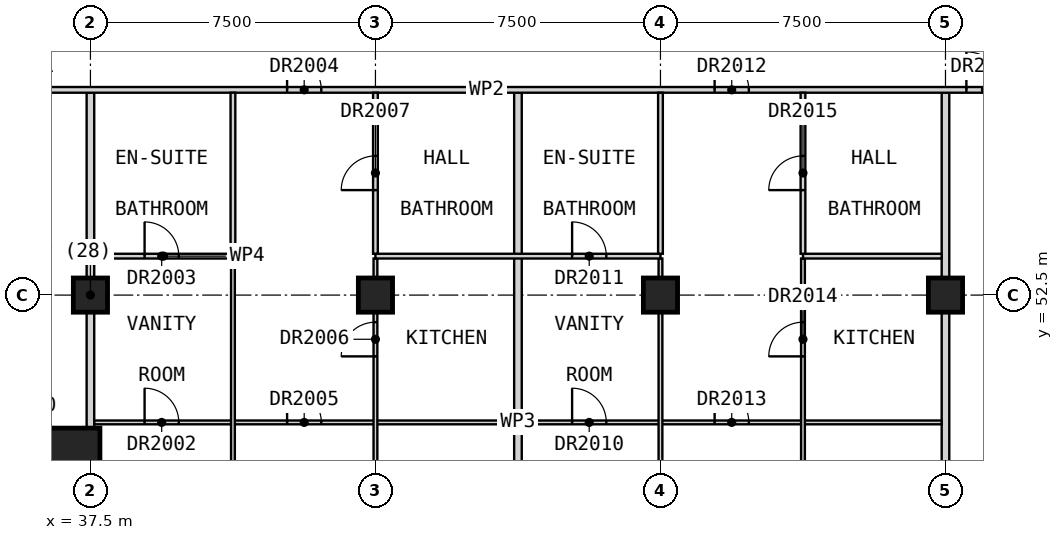
"""IFC4 building model, lengths in metres.
Left out: names, types, materials, properties, quantities, classifications, styles, units other than length and angle.
Written with IfcOpenShell. Run it as: python <this file> out.ifc"""

import sys

from ifc_helpers import new_model, si_unit, direction, frame, frame_2d, origin, origin_2d, place, context, subcontext, project, spatial, rectangle, extrude, element, fill, save


model = new_model("IFC4")
c1 = context("Model", 3, precision=1e-05, world=origin(), true_north=direction((0.0, 1.0)))
c2 = subcontext(c1, "Body", "Model", "MODEL_VIEW")
j1 = project(units=[si_unit("LENGTHUNIT", "METRE"), si_unit("PLANEANGLEUNIT", "RADIAN")], contexts=[c1])
p1 = place(None, origin())
s1 = spatial("IfcSite", under=j1, at=p1, CompositionType="ELEMENT")
p2 = place(p1, origin())
s2 = spatial("IfcBuilding", under=s1, at=p2, CompositionType="ELEMENT")
p3 = place(p2, frame((0.0, 0.0, 210.7)))
s3 = spatial("IfcBuildingStorey", under=s2, at=p3, CompositionType="ELEMENT", Elevation=210.7)
for number, where, z_axis, x_axis in (
    (1, (37.5, 52.5, 0.0), (0.0, 0.0, 1.0), (1.0, 0.0, 0.0)),
    (2, (45.0, 52.5, 0.0), (0.0, 0.0, 1.0), (1.0, 0.0, 0.0)),
    (3, (52.5, 52.5, 0.0), (0.0, 0.0, 1.0), (1.0, 0.0, 0.0)),
    (4, (60.0, 52.5, 0.0), (0.0, 0.0, 1.0), (1.0, 0.0, 0.0)),
):
    element("IfcColumn", number, at=place(p3, frame(where, z_axis=z_axis, x_axis=x_axis)), inside=s3, PredefinedType="COLUMN", context=c2, shape_type="SweptSolid", body=[
        extrude(rectangle(XDim=0.9, YDim=0.9, at=origin_2d()), origin(), (0.0, 0.0, 1.0), 3.5),
    ])
p4 = place(p3, frame((36.125, 47.375, 0.0), z_axis=(0.0, 0.0, 1.0), x_axis=(1.0, 0.0, 0.0)))
e5 = element("IfcColumn", 5, at=p4, inside=s3, PredefinedType="COLUMN", context=c2, shape_type="SweptSolid", body=[
    extrude(rectangle(XDim=3.25, YDim=3.25, at=origin_2d()), origin(), (0.0, 0.0, 1.0), 3.5),
])
p5 = place(p3, frame((37.5, 41.25, 0.0), z_axis=(0.0, 0.0, 1.0), x_axis=(0.0, 1.0, 0.0)))
e6 = element("IfcWall", 6, at=p5, inside=s3, PredefinedType="PARTITIONING", context=c2, shape_type="SweptSolid", body=[
    extrude(rectangle(XDim=16.575, YDim=0.2, at=frame_2d((8.288, 0.0))), origin(), (0.0, 0.0, 1.0), 2.75),
])
p6 = place(p3, frame((48.75, 42.06, 0.0), z_axis=(0.0, 0.0, 1.0), x_axis=(0.0, 1.0, 0.0)))
e7 = element("IfcWall", 7, at=p6, inside=s3, PredefinedType="PARTITIONING", context=c2, shape_type="SweptSolid", body=[
    extrude(rectangle(XDim=15.765, YDim=0.2, at=frame_2d((7.882, 0.0))), origin(), (0.0, 0.0, 1.0), 3.1),
])
p7 = place(p3, frame((60.0, 41.25, 0.0), z_axis=(0.0, 0.0, 1.0), x_axis=(0.0, 1.0, 0.0)))
e8 = element("IfcWall", 8, at=p7, inside=s3, PredefinedType="PARTITIONING", context=c2, shape_type="SweptSolid", body=[
    extrude(rectangle(XDim=16.575, YDim=0.2, at=frame_2d((8.288, 0.0))), origin(), (0.0, 0.0, 1.0), 3.1),
])
p8 = place(p3, frame((33.75, 57.9, 0.0), z_axis=(0.0, 0.0, 1.0), x_axis=(1.0, 0.0, 0.0)))
e9 = element("IfcWall", 9, at=p8, inside=s3, PredefinedType="PARTITIONING", context=c2, shape_type="SweptSolid", body=[
    extrude(rectangle(XDim=28.35, YDim=0.15, at=frame_2d((14.175, 0.0))), origin(), (0.0, 0.0, 1.0), 3.1),
])
p9 = place(p8, frame((1.375, 0.0, 0.0)))
e10 = element("IfcOpeningElement", 10, at=p9, cuts=e9, PredefinedType="OPENING", context=c2, shape_type="SweptSolid", body=[
    extrude(rectangle(XDim=1.0, YDim=2.1, at=frame_2d((0.5, 1.05))), frame((0.0, 0.085, 0.0), z_axis=(0.0, -1.0, 0.0), x_axis=(1.0, 0.0, 0.0)), (0.0, 0.0, 1.0), 0.17),
])
p10 = place(p8, frame((8.925, 0.0, 0.0)))
e11 = element("IfcOpeningElement", 11, at=p10, cuts=e9, PredefinedType="OPENING", context=c2, shape_type="SweptSolid", body=[
    extrude(rectangle(XDim=0.9, YDim=2.1, at=frame_2d((0.45, 1.05))), frame((0.0, 0.085, 0.0), z_axis=(0.0, -1.0, 0.0), x_axis=(1.0, 0.0, 0.0)), (0.0, 0.0, 1.0), 0.17),
])
p11 = place(p8, frame((20.175, 0.0, 0.0)))
e12 = element("IfcOpeningElement", 12, at=p11, cuts=e9, PredefinedType="OPENING", context=c2, shape_type="SweptSolid", body=[
    extrude(rectangle(XDim=0.9, YDim=2.1, at=frame_2d((0.45, 1.05))), frame((0.0, 0.085, 0.0), z_axis=(0.0, -1.0, 0.0), x_axis=(1.0, 0.0, 0.0)), (0.0, 0.0, 1.0), 0.17),
])
p12 = place(p8, frame((26.8, 0.0, 0.0)))
e13 = element("IfcOpeningElement", 13, at=p12, cuts=e9, PredefinedType="OPENING", context=c2, shape_type="SweptSolid", body=[
    extrude(rectangle(XDim=1.0, YDim=2.1, at=frame_2d((0.5, 1.05))), frame((0.0, 0.085, 0.0), z_axis=(0.0, -1.0, 0.0), x_axis=(1.0, 0.0, 0.0)), (0.0, 0.0, 1.0), 0.17),
])
p13 = place(p3, frame((37.6, 49.15, 0.0), z_axis=(0.0, 0.0, 1.0), x_axis=(1.0, 0.0, 0.0)))
e14 = element("IfcWall", 14, at=p13, inside=s3, PredefinedType="PARTITIONING", context=c2, shape_type="SweptSolid", body=[
    extrude(rectangle(XDim=22.3, YDim=0.1, at=frame_2d((11.15, 0.0))), origin(), (0.0, 0.0, 1.0), 3.1),
])
p14 = place(p13, frame((1.325, 0.0, 0.0)))
e15 = element("IfcOpeningElement", 15, at=p14, cuts=e14, PredefinedType="OPENING", context=c2, shape_type="SweptSolid", body=[
    extrude(rectangle(XDim=0.9, YDim=2.1, at=frame_2d((0.45, 1.05))), frame((0.0, 0.06, 0.0), z_axis=(0.0, -1.0, 0.0), x_axis=(1.0, 0.0, 0.0)), (0.0, 0.0, 1.0), 0.12),
])
p15 = place(p13, frame((5.075, 0.0, 0.0)))
e16 = element("IfcOpeningElement", 16, at=p15, cuts=e14, PredefinedType="OPENING", context=c2, shape_type="SweptSolid", body=[
    extrude(rectangle(XDim=0.9, YDim=2.1, at=frame_2d((0.45, 1.05))), frame((0.0, 0.06, 0.0), z_axis=(0.0, -1.0, 0.0), x_axis=(1.0, 0.0, 0.0)), (0.0, 0.0, 1.0), 0.12),
])
p16 = place(p13, frame((12.575, 0.0, 0.0)))
e17 = element("IfcOpeningElement", 17, at=p16, cuts=e14, PredefinedType="OPENING", context=c2, shape_type="SweptSolid", body=[
    extrude(rectangle(XDim=0.9, YDim=2.1, at=frame_2d((0.45, 1.05))), frame((0.0, 0.06, 0.0), z_axis=(0.0, -1.0, 0.0), x_axis=(1.0, 0.0, 0.0)), (0.0, 0.0, 1.0), 0.12),
])
p17 = place(p13, frame((16.325, 0.0, 0.0)))
e18 = element("IfcOpeningElement", 18, at=p17, cuts=e14, PredefinedType="OPENING", context=c2, shape_type="SweptSolid", body=[
    extrude(rectangle(XDim=0.9, YDim=2.1, at=frame_2d((0.45, 1.05))), frame((0.0, 0.06, 0.0), z_axis=(0.0, -1.0, 0.0), x_axis=(1.0, 0.0, 0.0)), (0.0, 0.0, 1.0), 0.12),
])
p18 = place(p3, frame((41.25, 42.06, 0.0), z_axis=(0.0, 0.0, 1.0), x_axis=(0.0, 1.0, 0.0)))
e19 = element("IfcWall", 19, at=p18, inside=s3, PredefinedType="PARTITIONING", context=c2, shape_type="SweptSolid", body=[
    extrude(rectangle(XDim=11.402, YDim=0.1, at=frame_2d((5.701, 0.0))), origin(), (0.0, 0.0, 1.0), 3.1),
])
p19 = place(p18, frame((2.69, 0.0, 0.0)))
e20 = element("IfcOpeningElement", 20, at=p19, cuts=e19, PredefinedType="OPENING", context=c2, shape_type="SweptSolid", body=[
    extrude(rectangle(XDim=0.9, YDim=2.1, at=frame_2d((0.45, 1.05))), frame((0.0, 0.06, 0.0), z_axis=(0.0, -1.0, 0.0), x_axis=(1.0, 0.0, 0.0)), (0.0, 0.0, 1.0), 0.12),
])
p20 = place(p3, frame((45.0, 41.25, 0.0), z_axis=(0.0, 0.0, 1.0), x_axis=(0.0, 1.0, 0.0)))
e21 = element("IfcWall", 21, at=p20, inside=s3, PredefinedType="PARTITIONING", context=c2, shape_type="SweptSolid", body=[
    extrude(rectangle(XDim=12.212, YDim=0.1, at=frame_2d((6.106, 0.0))), origin(), (0.0, 0.0, 1.0), 3.1),
])
p21 = place(p20, frame((9.637, 0.0, 0.0)))
e22 = element("IfcOpeningElement", 22, at=p21, cuts=e21, PredefinedType="OPENING", context=c2, shape_type="SweptSolid", body=[
    extrude(rectangle(XDim=0.9, YDim=2.1, at=frame_2d((0.45, 1.05))), frame((0.0, 0.06, 0.0), z_axis=(0.0, -1.0, 0.0), x_axis=(1.0, 0.0, 0.0)), (0.0, 0.0, 1.0), 0.12),
])
p22 = place(p20, frame((2.85, 0.0, 0.0)))
e23 = element("IfcOpeningElement", 23, at=p22, cuts=e21, PredefinedType="OPENING", context=c2, shape_type="SweptSolid", body=[
    extrude(rectangle(XDim=0.9, YDim=2.1, at=frame_2d((0.45, 1.05))), frame((0.0, 0.06, 0.0), z_axis=(0.0, -1.0, 0.0), x_axis=(1.0, 0.0, 0.0)), (0.0, 0.0, 1.0), 0.12),
])
p23 = place(p3, frame((52.5, 41.25, 0.0), z_axis=(0.0, 0.0, 1.0), x_axis=(0.0, 1.0, 0.0)))
e24 = element("IfcWall", 24, at=p23, inside=s3, PredefinedType="PARTITIONING", context=c2, shape_type="SweptSolid", body=[
    extrude(rectangle(XDim=12.212, YDim=0.1, at=frame_2d((6.106, 0.0))), origin(), (0.0, 0.0, 1.0), 3.1),
])
p24 = place(p23, frame((2.85, 0.0, 0.0)))
e25 = element("IfcOpeningElement", 25, at=p24, cuts=e24, PredefinedType="OPENING", context=c2, shape_type="SweptSolid", body=[
    extrude(rectangle(XDim=0.9, YDim=2.1, at=frame_2d((0.45, 1.05))), frame((0.0, 0.06, 0.0), z_axis=(0.0, -1.0, 0.0), x_axis=(1.0, 0.0, 0.0)), (0.0, 0.0, 1.0), 0.12),
])
p25 = place(p3, frame((56.25, 42.06, 0.0), z_axis=(0.0, 0.0, 1.0), x_axis=(0.0, 1.0, 0.0)))
e26 = element("IfcWall", 26, at=p25, inside=s3, PredefinedType="PARTITIONING", context=c2, shape_type="SweptSolid", body=[
    extrude(rectangle(XDim=11.402, YDim=0.1, at=frame_2d((5.701, 0.0))), origin(), (0.0, 0.0, 1.0), 3.1),
])
p26 = place(p25, frame((8.827, 0.0, 0.0)))
e27 = element("IfcOpeningElement", 27, at=p26, cuts=e26, PredefinedType="OPENING", context=c2, shape_type="SweptSolid", body=[
    extrude(rectangle(XDim=0.9, YDim=2.1, at=frame_2d((0.45, 1.05))), frame((0.0, 0.06, 0.0), z_axis=(0.0, -1.0, 0.0), x_axis=(1.0, 0.0, 0.0)), (0.0, 0.0, 1.0), 0.12),
])
p27 = place(p25, frame((2.69, 0.0, 0.0)))
e28 = element("IfcOpeningElement", 28, at=p27, cuts=e26, PredefinedType="OPENING", context=c2, shape_type="SweptSolid", body=[
    extrude(rectangle(XDim=0.9, YDim=2.1, at=frame_2d((0.45, 1.05))), frame((0.0, 0.06, 0.0), z_axis=(0.0, -1.0, 0.0), x_axis=(1.0, 0.0, 0.0)), (0.0, 0.0, 1.0), 0.12),
])
p28 = place(p3, frame((37.6, 53.525, 0.0), z_axis=(0.0, 0.0, 1.0), x_axis=(1.0, 0.0, 0.0)))
e29 = element("IfcWall", 29, at=p28, inside=s3, PredefinedType="PARTITIONING", context=c2, shape_type="SweptSolid", body=[
    extrude(rectangle(XDim=3.65, YDim=0.125, at=frame_2d((1.825, 0.0))), origin(), (0.0, 0.0, 1.0), 3.1),
])
p29 = place(p28, frame((1.325, 0.0, 0.0)))
e30 = element("IfcOpeningElement", 30, at=p29, cuts=e29, PredefinedType="OPENING", context=c2, shape_type="SweptSolid", body=[
    extrude(rectangle(XDim=0.9, YDim=2.1, at=frame_2d((0.45, 1.05))), frame((0.0, 0.073, 0.0), z_axis=(0.0, -1.0, 0.0), x_axis=(1.0, 0.0, 0.0)), (0.0, 0.0, 1.0), 0.145),
])
p30 = place(p3, frame((45.0, 53.525, 0.0), z_axis=(0.0, 0.0, 1.0), x_axis=(1.0, 0.0, 0.0)))
e31 = element("IfcWall", 31, at=p30, inside=s3, PredefinedType="PARTITIONING", context=c2, shape_type="SweptSolid", body=[
    extrude(rectangle(XDim=7.5, YDim=0.125, at=frame_2d((3.75, 0.0))), origin(), (0.0, 0.0, 1.0), 3.1),
])
p31 = place(p30, frame((5.175, 0.0, 0.0)))
e32 = element("IfcOpeningElement", 32, at=p31, cuts=e31, PredefinedType="OPENING", context=c2, shape_type="SweptSolid", body=[
    extrude(rectangle(XDim=0.9, YDim=2.1, at=frame_2d((0.45, 1.05))), frame((0.0, 0.073, 0.0), z_axis=(0.0, -1.0, 0.0), x_axis=(1.0, 0.0, 0.0)), (0.0, 0.0, 1.0), 0.145),
])
p32 = place(p3, frame((56.25, 53.525, 0.0), z_axis=(0.0, 0.0, 1.0), x_axis=(1.0, 0.0, 0.0)))
e33 = element("IfcWall", 33, at=p32, inside=s3, PredefinedType="PARTITIONING", context=c2, shape_type="SweptSolid", body=[
    extrude(rectangle(XDim=3.65, YDim=0.125, at=frame_2d((1.825, 0.0))), origin(), (0.0, 0.0, 1.0), 3.1),
])
p33 = place(p3, frame((41.25, 53.587, 0.0), z_axis=(0.0, 0.0, 1.0), x_axis=(0.0, 1.0, 0.0)))
e34 = element("IfcWall", 34, at=p33, inside=s3, PredefinedType="PARTITIONING", context=c2, shape_type="SweptSolid", body=[
    extrude(rectangle(XDim=4.238, YDim=0.125, at=frame_2d((2.119, 0.0))), origin(), (0.0, 0.0, 1.0), 3.1),
])
p34 = place(p3, frame((45.0, 53.587, 0.0), z_axis=(0.0, 0.0, 1.0), x_axis=(0.0, 1.0, 0.0)))
e35 = element("IfcWall", 35, at=p34, inside=s3, PredefinedType="PARTITIONING", context=c2, shape_type="SweptSolid", body=[
    extrude(rectangle(XDim=4.238, YDim=0.125, at=frame_2d((2.119, 0.0))), origin(), (0.0, 0.0, 1.0), 3.1),
])
p35 = place(p34, frame((1.675, 0.0, 0.0)))
e36 = element("IfcOpeningElement", 36, at=p35, cuts=e35, PredefinedType="OPENING", context=c2, shape_type="SweptSolid", body=[
    extrude(rectangle(XDim=0.9, YDim=2.1, at=frame_2d((0.45, 1.05))), frame((0.0, 0.073, 0.0), z_axis=(0.0, -1.0, 0.0), x_axis=(1.0, 0.0, 0.0)), (0.0, 0.0, 1.0), 0.145),
])
p36 = place(p3, frame((52.5, 53.587, 0.0), z_axis=(0.0, 0.0, 1.0), x_axis=(0.0, 1.0, 0.0)))
e37 = element("IfcWall", 37, at=p36, inside=s3, PredefinedType="PARTITIONING", context=c2, shape_type="SweptSolid", body=[
    extrude(rectangle(XDim=4.238, YDim=0.125, at=frame_2d((2.119, 0.0))), origin(), (0.0, 0.0, 1.0), 3.1),
])
p37 = place(p3, frame((56.25, 53.587, 0.0), z_axis=(0.0, 0.0, 1.0), x_axis=(0.0, 1.0, 0.0)))
e38 = element("IfcWall", 38, at=p37, inside=s3, PredefinedType="PARTITIONING", context=c2, shape_type="SweptSolid", body=[
    extrude(rectangle(XDim=4.238, YDim=0.125, at=frame_2d((2.119, 0.0))), origin(), (0.0, 0.0, 1.0), 3.1),
])
p38 = place(p37, frame((1.675, 0.0, 0.0)))
e39 = element("IfcOpeningElement", 39, at=p38, cuts=e38, PredefinedType="OPENING", context=c2, shape_type="SweptSolid", body=[
    extrude(rectangle(XDim=0.9, YDim=2.1, at=frame_2d((0.45, 1.05))), frame((0.0, 0.073, 0.0), z_axis=(0.0, -1.0, 0.0), x_axis=(1.0, 0.0, 0.0)), (0.0, 0.0, 1.0), 0.145),
])
p39 = place(p14, origin())
e40 = element("IfcDoor", 40, at=p39, inside=s3, OperationType="SINGLE_SWING_LEFT", PredefinedType="DOOR", context=c2, shape_type="SweptSolid", body=[
    extrude(rectangle(XDim=0.9, YDim=2.1, at=frame_2d((0.45, 1.05))), frame((0.0, 0.025, 0.0), z_axis=(0.0, -1.0, 0.0), x_axis=(1.0, 0.0, 0.0)), (0.0, 0.0, 1.0), 0.05),
])
fill(e15, e40)
p40 = place(p29, origin())
e41 = element("IfcDoor", 41, at=p40, inside=s3, OperationType="SINGLE_SWING_LEFT", PredefinedType="DOOR", context=c2, shape_type="SweptSolid", body=[
    extrude(rectangle(XDim=0.9, YDim=2.1, at=frame_2d((0.45, 1.05))), frame((0.0, 0.025, 0.0), z_axis=(0.0, -1.0, 0.0), x_axis=(1.0, 0.0, 0.0)), (0.0, 0.0, 1.0), 0.05),
])
fill(e30, e41)
p41 = place(p10, origin())
e42 = element("IfcDoor", 42, at=p41, inside=s3, OperationType="SINGLE_SWING_RIGHT", PredefinedType="DOOR", context=c2, shape_type="SweptSolid", body=[
    extrude(rectangle(XDim=0.9, YDim=2.1, at=frame_2d((0.45, 1.05))), frame((0.0, 0.025, 0.0), z_axis=(0.0, -1.0, 0.0), x_axis=(1.0, 0.0, 0.0)), (0.0, 0.0, 1.0), 0.05),
])
fill(e11, e42)
p42 = place(p15, origin())
e43 = element("IfcDoor", 43, at=p42, inside=s3, OperationType="SINGLE_SWING_LEFT", PredefinedType="DOOR", context=c2, shape_type="SweptSolid", body=[
    extrude(rectangle(XDim=0.9, YDim=2.1, at=frame_2d((0.45, 1.05))), frame((0.0, 0.025, 0.0), z_axis=(0.0, -1.0, 0.0), x_axis=(1.0, 0.0, 0.0)), (0.0, 0.0, 1.0), 0.05),
])
fill(e16, e43)
p43 = place(p21, origin())
e44 = element("IfcDoor", 44, at=p43, inside=s3, OperationType="SINGLE_SWING_RIGHT", PredefinedType="DOOR", context=c2, shape_type="SweptSolid", body=[
    extrude(rectangle(XDim=0.9, YDim=2.1, at=frame_2d((0.45, 1.05))), frame((0.0, 0.025, 0.0), z_axis=(0.0, -1.0, 0.0), x_axis=(1.0, 0.0, 0.0)), (0.0, 0.0, 1.0), 0.05),
])
fill(e22, e44)
p44 = place(p35, origin())
e45 = element("IfcDoor", 45, at=p44, inside=s3, OperationType="SINGLE_SWING_RIGHT", PredefinedType="DOOR", context=c2, shape_type="SweptSolid", body=[
    extrude(rectangle(XDim=0.9, YDim=2.1, at=frame_2d((0.45, 1.05))), frame((0.0, 0.025, 0.0), z_axis=(0.0, -1.0, 0.0), x_axis=(1.0, 0.0, 0.0)), (0.0, 0.0, 1.0), 0.05),
])
fill(e36, e45)
p45 = place(p16, origin())
e46 = element("IfcDoor", 46, at=p45, inside=s3, OperationType="SINGLE_SWING_LEFT", PredefinedType="DOOR", context=c2, shape_type="SweptSolid", body=[
    extrude(rectangle(XDim=0.9, YDim=2.1, at=frame_2d((0.45, 1.05))), frame((0.0, 0.025, 0.0), z_axis=(0.0, -1.0, 0.0), x_axis=(1.0, 0.0, 0.0)), (0.0, 0.0, 1.0), 0.05),
])
fill(e17, e46)
p46 = place(p31, origin())
e47 = element("IfcDoor", 47, at=p46, inside=s3, OperationType="SINGLE_SWING_LEFT", PredefinedType="DOOR", context=c2, shape_type="SweptSolid", body=[
    extrude(rectangle(XDim=0.9, YDim=2.1, at=frame_2d((0.45, 1.05))), frame((0.0, 0.025, 0.0), z_axis=(0.0, -1.0, 0.0), x_axis=(1.0, 0.0, 0.0)), (0.0, 0.0, 1.0), 0.05),
])
fill(e32, e47)
p47 = place(p11, origin())
e48 = element("IfcDoor", 48, at=p47, inside=s3, OperationType="SINGLE_SWING_RIGHT", PredefinedType="DOOR", context=c2, shape_type="SweptSolid", body=[
    extrude(rectangle(XDim=0.9, YDim=2.1, at=frame_2d((0.45, 1.05))), frame((0.0, 0.025, 0.0), z_axis=(0.0, -1.0, 0.0), x_axis=(1.0, 0.0, 0.0)), (0.0, 0.0, 1.0), 0.05),
])
fill(e12, e48)
p48 = place(p17, origin())
e49 = element("IfcDoor", 49, at=p48, inside=s3, OperationType="SINGLE_SWING_LEFT", PredefinedType="DOOR", context=c2, shape_type="SweptSolid", body=[
    extrude(rectangle(XDim=0.9, YDim=2.1, at=frame_2d((0.45, 1.05))), frame((0.0, 0.025, 0.0), z_axis=(0.0, -1.0, 0.0), x_axis=(1.0, 0.0, 0.0)), (0.0, 0.0, 1.0), 0.05),
])
fill(e18, e49)
p49 = place(p26, origin())
e50 = element("IfcDoor", 50, at=p49, inside=s3, OperationType="SINGLE_SWING_RIGHT", PredefinedType="DOOR", context=c2, shape_type="SweptSolid", body=[
    extrude(rectangle(XDim=0.9, YDim=2.1, at=frame_2d((0.45, 1.05))), frame((0.0, 0.025, 0.0), z_axis=(0.0, -1.0, 0.0), x_axis=(1.0, 0.0, 0.0)), (0.0, 0.0, 1.0), 0.05),
])
fill(e27, e50)
p50 = place(p38, origin())
e51 = element("IfcDoor", 51, at=p50, inside=s3, OperationType="SINGLE_SWING_RIGHT", PredefinedType="DOOR", context=c2, shape_type="SweptSolid", body=[
    extrude(rectangle(XDim=0.9, YDim=2.1, at=frame_2d((0.45, 1.05))), frame((0.0, 0.025, 0.0), z_axis=(0.0, -1.0, 0.0), x_axis=(1.0, 0.0, 0.0)), (0.0, 0.0, 1.0), 0.05),
])
fill(e39, e51)
p51 = place(p12, origin())
e52 = element("IfcDoor", 52, at=p51, inside=s3, OperationType="SINGLE_SWING_RIGHT", PredefinedType="DOOR", context=c2, shape_type="SweptSolid", body=[
    extrude(rectangle(XDim=1.0, YDim=2.1, at=frame_2d((0.5, 1.05))), frame((0.0, 0.025, 0.0), z_axis=(0.0, -1.0, 0.0), x_axis=(1.0, 0.0, 0.0)), (0.0, 0.0, 1.0), 0.05),
])
fill(e13, e52)
save(model, sys.argv[1])
